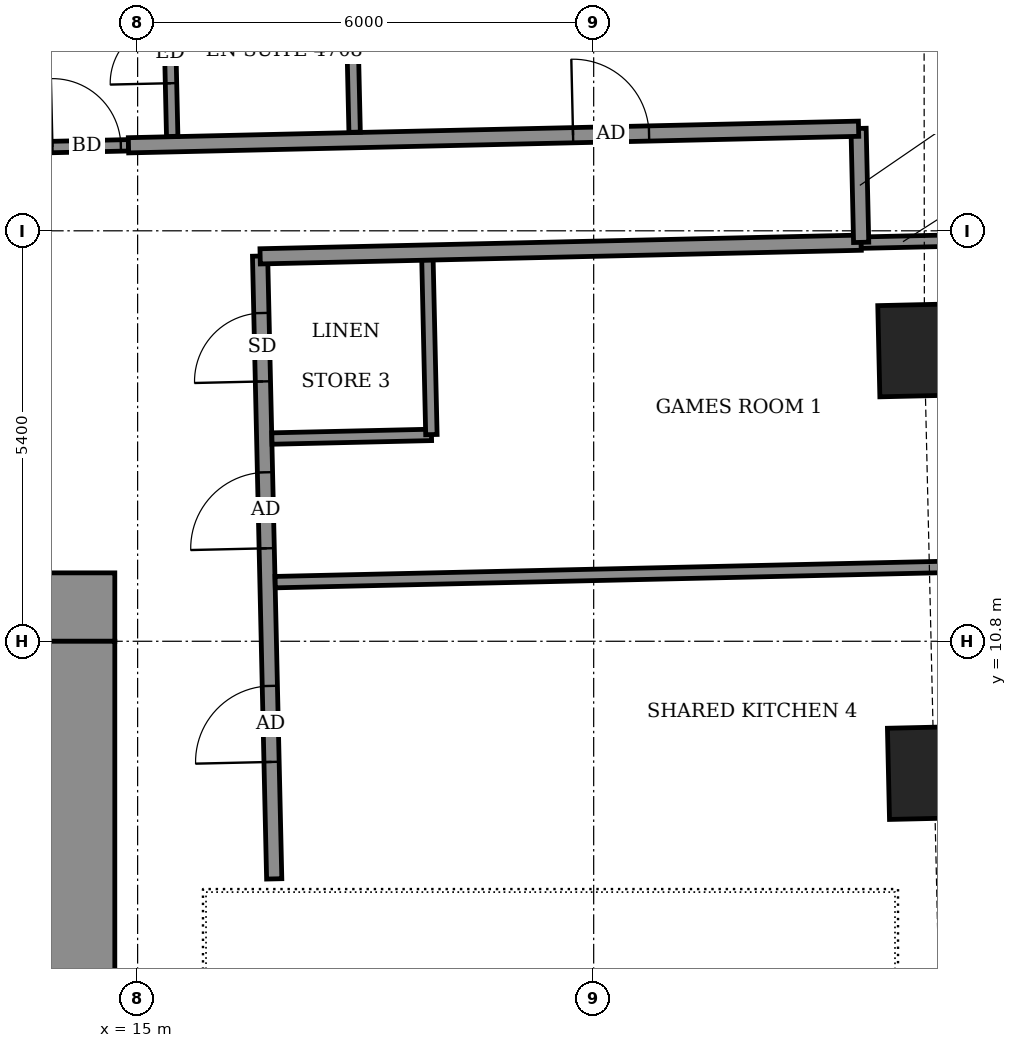
"""IFC4 building model, lengths in metres.
Left out: names, types, materials, properties, quantities, classifications, styles, units other than length and angle.
Written with IfcOpenShell. Run it as: python <this file> out.ifc"""

import sys

from ifc_helpers import new_model, si_unit, direction, frame, frame_2d, origin, origin_2d, place, context, subcontext, project, spatial, rectangle, extrude, element, fill, save


model = new_model("IFC4")
c1 = context("Model", 3, precision=1e-05, world=origin(), true_north=direction((0.0, 1.0)))
c2 = subcontext(c1, "Body", "Model", "MODEL_VIEW")
j1 = project(units=[si_unit("LENGTHUNIT", "METRE"), si_unit("PLANEANGLEUNIT", "RADIAN")], contexts=[c1])
p1 = place(None, origin())
s1 = spatial("IfcSite", under=j1, at=p1, CompositionType="ELEMENT")
p2 = place(p1, origin())
s2 = spatial("IfcBuilding", under=s1, at=p2, CompositionType="ELEMENT")
p3 = place(p2, frame((0.0, 0.0, 186.1)))
s3 = spatial("IfcBuildingStorey", under=s2, at=p3, CompositionType="ELEMENT", Elevation=186.1)
for number, where, z_axis, x_axis in (
    (1, (25.478, 9.069, -0.55), (0.0, 0.0, 1.0), (-0.023, 1.0, 0.0)),
    (2, (25.351, 14.629, -0.55), (0.0, 0.0, 1.0), (-0.023, 1.0, 0.0)),
):
    element("IfcColumn", number, at=place(p3, frame(where, z_axis=z_axis, x_axis=x_axis)), inside=s3, PredefinedType="COLUMN", context=c2, shape_type="SweptSolid", body=[
        extrude(rectangle(XDim=1.2, YDim=1.2, at=origin_2d()), origin(), (0.0, 0.0, 1.0), 3.6),
    ])
p4 = place(p3, frame((16.797, 7.674, 0.0), z_axis=(0.0, 0.0, 1.0), x_axis=(-0.022698399288, 0.999742358145, 0.0)))
e3 = element("IfcWall", 3, at=p4, inside=s3, PredefinedType="PARTITIONING", context=c2, shape_type="SweptSolid", body=[
    extrude(rectangle(XDim=8.196, YDim=0.2, at=frame_2d((4.098, 0.0))), origin(), (0.0, 0.0, 1.0), 3.05),
])
p5 = place(p4, frame((1.539, 0.0, 0.0)))
e4 = element("IfcOpeningElement", 4, at=p5, cuts=e3, PredefinedType="OPENING", context=c2, shape_type="SweptSolid", body=[
    extrude(rectangle(XDim=1.0, YDim=2.1, at=frame_2d((0.5, 1.05))), frame((0.0, 0.11, 0.0), z_axis=(0.0, -1.0, 0.0), x_axis=(1.0, 0.0, 0.0)), (0.0, 0.0, 1.0), 0.22),
])
p6 = place(p4, frame((4.35, 0.0, 0.0)))
e5 = element("IfcOpeningElement", 5, at=p6, cuts=e3, PredefinedType="OPENING", context=c2, shape_type="SweptSolid", body=[
    extrude(rectangle(XDim=1.0, YDim=2.1, at=frame_2d((0.5, 1.05))), frame((0.0, 0.11, 0.0), z_axis=(0.0, -1.0, 0.0), x_axis=(1.0, 0.0, 0.0)), (0.0, 0.0, 1.0), 0.22),
])
p7 = place(p4, frame((6.546, 0.0, 0.0)))
e6 = element("IfcOpeningElement", 6, at=p7, cuts=e3, PredefinedType="OPENING", context=c2, shape_type="SweptSolid", body=[
    extrude(rectangle(XDim=0.9, YDim=2.1, at=frame_2d((0.45, 1.05))), frame((0.0, 0.11, 0.0), z_axis=(0.0, -1.0, 0.0), x_axis=(1.0, 0.0, 0.0)), (0.0, 0.0, 1.0), 0.22),
])
p8 = place(p3, frame((16.81, 11.578, 0.0), z_axis=(0.0, 0.0, 1.0), x_axis=(0.999742500104, 0.022692145895, 0.0)))
e7 = element("IfcWall", 7, at=p8, inside=s3, PredefinedType="PARTITIONING", context=c2, shape_type="SweptSolid", body=[
    extrude(rectangle(XDim=8.908, YDim=0.15, at=frame_2d((4.454, 0.0))), origin(), (0.0, 0.0, 1.0), 2.55),
])
p9 = place(p3, frame((16.767, 13.467, 0.0), z_axis=(0.0, 0.0, 1.0), x_axis=(0.999740212033, 0.022792727877, 0.0)))
e8 = element("IfcWall", 8, at=p9, inside=s3, PredefinedType="PARTITIONING", context=c2, shape_type="SweptSolid", body=[
    extrude(rectangle(XDim=2.099, YDim=0.15, at=frame_2d((1.05, 0.0))), origin(), (0.0, 0.0, 1.0), 3.05),
])
p10 = place(p3, frame((18.865, 13.519, 0.0), z_axis=(0.0, 0.0, 1.0), x_axis=(-0.022612884682, 0.999744296031, 0.0)))
e9 = element("IfcWall", 9, at=p10, inside=s3, PredefinedType="PARTITIONING", context=c2, shape_type="SweptSolid", body=[
    extrude(rectangle(XDim=2.3, YDim=0.15, at=frame_2d((1.15, 0.0))), origin(), (0.0, 0.0, 1.0), 3.05),
])
p11 = place(p3, frame((16.612, 15.864, 0.0), z_axis=(0.0, 0.0, 1.0), x_axis=(0.999741181744, 0.022750154412, 0.0)))
e10 = element("IfcWall", 10, at=p11, inside=s3, PredefinedType="PARTITIONING", context=c2, shape_type="SweptSolid", body=[
    extrude(rectangle(XDim=7.909, YDim=0.2, at=frame_2d((3.955, 0.0))), origin(), (0.0, 0.0, 1.0), 3.05),
])
p12 = place(p3, frame((24.519, 16.044, 0.0), z_axis=(0.0, 0.0, 1.0), x_axis=(0.999738732953, 0.022857511541, 0.0)))
e11 = element("IfcWall", 11, at=p12, inside=s3, PredefinedType="PARTITIONING", context=c2, shape_type="SweptSolid", body=[
    extrude(rectangle(XDim=1.1, YDim=0.15, at=frame_2d((0.55, 0.0))), origin(), (0.0, 0.0, 1.0), 2.55),
])
p13 = place(p3, frame((24.519, 16.048, 0.0), z_axis=(0.0, 0.0, 1.0), x_axis=(-0.022632637625, 0.99974384905, 0.0)))
e12 = element("IfcWall", 12, at=p13, inside=s3, PredefinedType="PARTITIONING", context=c2, shape_type="SweptSolid", body=[
    extrude(rectangle(XDim=1.5, YDim=0.2, at=frame_2d((0.75, 0.0))), origin(), (0.0, 0.0, 1.0), 3.05),
])
p14 = place(p3, frame((-15.649, 16.633, 0.0), z_axis=(0.0, 0.0, 1.0), x_axis=(0.999743261737, 0.022658565952, 0.0)))
e13 = element("IfcWall", 13, at=p14, inside=s3, PredefinedType="PARTITIONING", context=c2, shape_type="SweptSolid", body=[
    extrude(rectangle(XDim=30.536, YDim=0.15, at=frame_2d((15.268, 0.0))), origin(), (0.0, 0.0, 1.0), 3.05),
])
p15 = place(p14, frame((29.536, 0.0, 0.0)))
e14 = element("IfcOpeningElement", 14, at=p15, cuts=e13, PredefinedType="OPENING", context=c2, shape_type="SweptSolid", body=[
    extrude(rectangle(XDim=0.9, YDim=2.1, at=frame_2d((0.45, 1.05))), frame((0.0, 0.085, 0.0), z_axis=(0.0, -1.0, 0.0), x_axis=(1.0, 0.0, 0.0)), (0.0, 0.0, 1.0), 0.17),
])
p16 = place(p14, frame((27.965, 0.0, 0.0)))
e15 = element("IfcOpeningElement", 15, at=p16, cuts=e13, PredefinedType="OPENING", context=c2, shape_type="SweptSolid", body=[
    extrude(rectangle(XDim=0.9, YDim=2.1, at=frame_2d((0.45, 1.05))), frame((0.0, 0.085, 0.0), z_axis=(0.0, -1.0, 0.0), x_axis=(1.0, 0.0, 0.0)), (0.0, 0.0, 1.0), 0.17),
])
p17 = place(p14, frame((21.365, 0.0, 0.0)))
e16 = element("IfcOpeningElement", 16, at=p17, cuts=e13, PredefinedType="OPENING", context=c2, shape_type="SweptSolid", body=[
    extrude(rectangle(XDim=0.9, YDim=2.1, at=frame_2d((0.45, 1.05))), frame((0.0, 0.085, 0.0), z_axis=(0.0, -1.0, 0.0), x_axis=(1.0, 0.0, 0.0)), (0.0, 0.0, 1.0), 0.17),
])
p18 = place(p14, frame((19.565, 0.0, 0.0)))
e17 = element("IfcOpeningElement", 17, at=p18, cuts=e13, PredefinedType="OPENING", context=c2, shape_type="SweptSolid", body=[
    extrude(rectangle(XDim=0.9, YDim=2.1, at=frame_2d((0.45, 1.05))), frame((0.0, 0.085, 0.0), z_axis=(0.0, -1.0, 0.0), x_axis=(1.0, 0.0, 0.0)), (0.0, 0.0, 1.0), 0.17),
])
p19 = place(p14, frame((12.965, 0.0, 0.0)))
e18 = element("IfcOpeningElement", 18, at=p19, cuts=e13, PredefinedType="OPENING", context=c2, shape_type="SweptSolid", body=[
    extrude(rectangle(XDim=0.9, YDim=2.1, at=frame_2d((0.45, 1.05))), frame((0.0, 0.085, 0.0), z_axis=(0.0, -1.0, 0.0), x_axis=(1.0, 0.0, 0.0)), (0.0, 0.0, 1.0), 0.17),
])
p20 = place(p14, frame((11.14, 0.0, 0.0)))
e19 = element("IfcOpeningElement", 19, at=p20, cuts=e13, PredefinedType="OPENING", context=c2, shape_type="SweptSolid", body=[
    extrude(rectangle(XDim=0.9, YDim=2.1, at=frame_2d((0.45, 1.05))), frame((0.0, 0.085, 0.0), z_axis=(0.0, -1.0, 0.0), x_axis=(1.0, 0.0, 0.0)), (0.0, 0.0, 1.0), 0.17),
])
p21 = place(p14, frame((4.515, 0.0, 0.0)))
e20 = element("IfcOpeningElement", 20, at=p21, cuts=e13, PredefinedType="OPENING", context=c2, shape_type="SweptSolid", body=[
    extrude(rectangle(XDim=0.9, YDim=2.1, at=frame_2d((0.45, 1.05))), frame((0.0, 0.085, 0.0), z_axis=(0.0, -1.0, 0.0), x_axis=(1.0, 0.0, 0.0)), (0.0, 0.0, 1.0), 0.17),
])
p22 = place(p14, frame((2.715, 0.0, 0.0)))
e21 = element("IfcOpeningElement", 21, at=p22, cuts=e13, PredefinedType="OPENING", context=c2, shape_type="SweptSolid", body=[
    extrude(rectangle(XDim=0.9, YDim=2.1, at=frame_2d((0.45, 1.05))), frame((0.0, 0.085, 0.0), z_axis=(0.0, -1.0, 0.0), x_axis=(1.0, 0.0, 0.0)), (0.0, 0.0, 1.0), 0.17),
])
p23 = place(p3, frame((14.88, 17.325, 0.0), z_axis=(0.0, 0.0, 1.0), x_axis=(0.999742504166, 0.022691966963, 0.0)))
e22 = element("IfcWall", 22, at=p23, inside=s3, PredefinedType="PARTITIONING", context=c2, shape_type="SweptSolid", body=[
    extrude(rectangle(XDim=9.608, YDim=0.2, at=frame_2d((4.804, 0.0))), origin(), (0.0, 0.0, 1.0), 3.05),
])
p24 = place(p23, frame((5.85, 0.0, 0.0)))
e23 = element("IfcOpeningElement", 23, at=p24, cuts=e22, PredefinedType="OPENING", context=c2, shape_type="SweptSolid", body=[
    extrude(rectangle(XDim=1.0, YDim=2.1, at=frame_2d((0.5, 1.05))), frame((0.0, 0.11, 0.0), z_axis=(0.0, -1.0, 0.0), x_axis=(1.0, 0.0, 0.0)), (0.0, 0.0, 1.0), 0.22),
])
p25 = place(p3, frame((15.455, 17.442, 0.0), z_axis=(0.0, 0.0, 1.0), x_axis=(-0.022603288534, 0.999744513037, 0.0)))
e24 = element("IfcWall", 24, at=p25, inside=s3, PredefinedType="PARTITIONING", context=c2, shape_type="SweptSolid", body=[
    extrude(rectangle(XDim=2.301, YDim=0.15, at=frame_2d((1.15, 0.0))), origin(), (0.0, 0.0, 1.0), 3.05),
])
p26 = place(p25, frame((0.7, 0.0, 0.0)))
e25 = element("IfcOpeningElement", 25, at=p26, cuts=e24, PredefinedType="OPENING", context=c2, shape_type="SweptSolid", body=[
    extrude(rectangle(XDim=0.8, YDim=2.1, at=frame_2d((0.4, 1.05))), frame((0.0, 0.085, 0.0), z_axis=(0.0, -1.0, 0.0), x_axis=(1.0, 0.0, 0.0)), (0.0, 0.0, 1.0), 0.17),
])
p27 = place(p3, frame((17.855, 17.497, 0.0), z_axis=(0.0, 0.0, 1.0), x_axis=(-0.022672114006, 0.999742954587, 0.0)))
e26 = element("IfcWall", 26, at=p27, inside=s3, PredefinedType="PARTITIONING", context=c2, shape_type="SweptSolid", body=[
    extrude(rectangle(XDim=6.526, YDim=0.15, at=frame_2d((3.263, 0.0))), origin(), (0.0, 0.0, 1.0), 2.55),
])
p28 = place(p3, frame((-14.7, 11.25, 0.0), z_axis=(0.0, 0.0, 1.0), x_axis=(1.0, 0.0, 0.0)))
e27 = element("IfcWall", 27, at=p28, inside=s3, PredefinedType="SHEAR", context=c2, shape_type="SweptSolid", body=[
    extrude(rectangle(XDim=29.4, YDim=0.9, at=frame_2d((14.7, 0.0))), origin(), (0.0, 0.0, 1.0), 3.6),
])
p29 = place(p3, frame((14.25, -10.8, 0.0), z_axis=(0.0, 0.0, 1.0), x_axis=(0.0, 1.0, 0.0)))
e28 = element("IfcWall", 28, at=p29, inside=s3, PredefinedType="SHEAR", context=c2, shape_type="SweptSolid", body=[
    extrude(rectangle(XDim=21.6, YDim=0.9, at=frame_2d((10.8, 0.0))), origin(), (0.0, 0.0, 1.0), 3.6),
])
p30 = place(p29, frame((1.2, 0.0, 0.0)))
e29 = element("IfcOpeningElement", 29, at=p30, cuts=e28, PredefinedType="OPENING", context=c2, shape_type="SweptSolid", body=[
    extrude(rectangle(XDim=1.2, YDim=2.1, at=frame_2d((0.6, 1.05))), frame((0.0, 0.46, 0.0), z_axis=(0.0, -1.0, 0.0), x_axis=(1.0, 0.0, 0.0)), (0.0, 0.0, 1.0), 0.92),
])
p31 = place(p5, origin())
e30 = element("IfcDoor", 30, at=p31, inside=s3, OperationType="SINGLE_SWING_RIGHT", PredefinedType="DOOR", context=c2, shape_type="SweptSolid", body=[
    extrude(rectangle(XDim=1.0, YDim=2.1, at=frame_2d((0.5, 1.05))), frame((0.0, 0.025, 0.0), z_axis=(0.0, -1.0, 0.0), x_axis=(1.0, 0.0, 0.0)), (0.0, 0.0, 1.0), 0.05),
])
fill(e4, e30)
p32 = place(p6, origin())
e31 = element("IfcDoor", 31, at=p32, inside=s3, OperationType="SINGLE_SWING_LEFT", PredefinedType="DOOR", context=c2, shape_type="SweptSolid", body=[
    extrude(rectangle(XDim=1.0, YDim=2.1, at=frame_2d((0.5, 1.05))), frame((0.0, 0.025, 0.0), z_axis=(0.0, -1.0, 0.0), x_axis=(1.0, 0.0, 0.0)), (0.0, 0.0, 1.0), 0.05),
])
fill(e5, e31)
p33 = place(p7, origin())
e32 = element("IfcDoor", 32, at=p33, inside=s3, OperationType="SINGLE_SWING_LEFT", PredefinedType="DOOR", context=c2, shape_type="SweptSolid", body=[
    extrude(rectangle(XDim=0.9, YDim=2.1, at=frame_2d((0.45, 1.05))), frame((0.0, 0.025, 0.0), z_axis=(0.0, -1.0, 0.0), x_axis=(1.0, 0.0, 0.0)), (0.0, 0.0, 1.0), 0.05),
])
fill(e6, e32)
p34 = place(p24, origin())
e33 = element("IfcDoor", 33, at=p34, inside=s3, OperationType="SINGLE_SWING_RIGHT", PredefinedType="DOOR", context=c2, shape_type="SweptSolid", body=[
    extrude(rectangle(XDim=1.0, YDim=2.1, at=frame_2d((0.5, 1.05))), frame((0.0, 0.025, 0.0), z_axis=(0.0, -1.0, 0.0), x_axis=(1.0, 0.0, 0.0)), (0.0, 0.0, 1.0), 0.05),
])
fill(e23, e33)
p35 = place(p15, origin())
e34 = element("IfcDoor", 34, at=p35, inside=s3, OperationType="SINGLE_SWING_RIGHT", PredefinedType="DOOR", context=c2, shape_type="SweptSolid", body=[
    extrude(rectangle(XDim=0.9, YDim=2.1, at=frame_2d((0.45, 1.05))), frame((0.0, 0.025, 0.0), z_axis=(0.0, -1.0, 0.0), x_axis=(1.0, 0.0, 0.0)), (0.0, 0.0, 1.0), 0.05),
])
fill(e14, e34)
p36 = place(p26, origin())
e35 = element("IfcDoor", 35, at=p36, inside=s3, OperationType="SINGLE_SWING_RIGHT", PredefinedType="DOOR", context=c2, shape_type="SweptSolid", body=[
    extrude(rectangle(XDim=0.8, YDim=2.1, at=frame_2d((0.4, 1.05))), frame((0.0, 0.025, 0.0), z_axis=(0.0, -1.0, 0.0), x_axis=(1.0, 0.0, 0.0)), (0.0, 0.0, 1.0), 0.05),
])
fill(e25, e35)
save(model, sys.argv[1])
